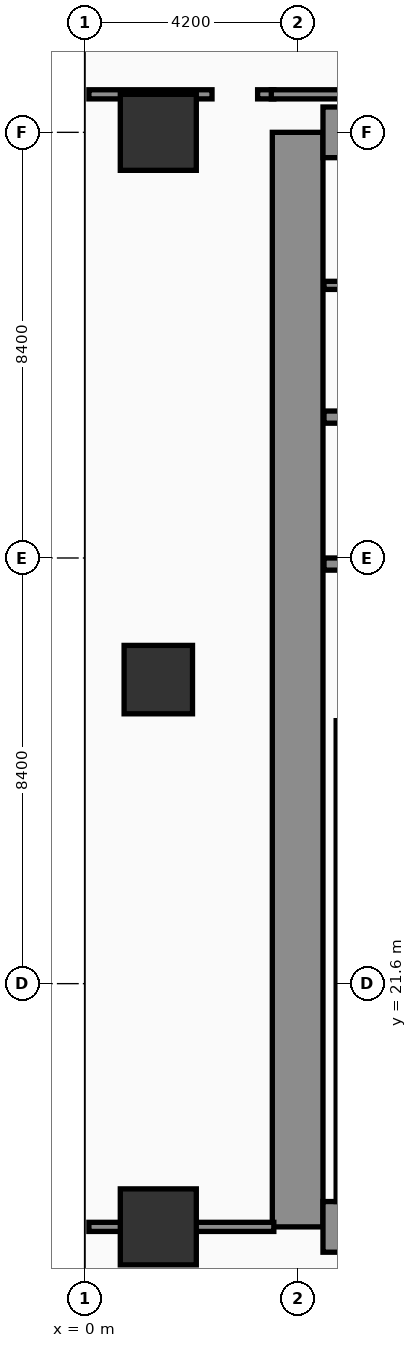
"""IFC4 building model, lengths in metres.
Left out: names, types, materials, properties, quantities, classifications, styles, units other than length and angle.
Written with IfcOpenShell. Run it as: python <this file> out.ifc"""

import sys

from ifc_helpers import new_model, si_unit, direction, frame, frame_2d, origin, origin_2d, place, context, subcontext, project, spatial, rectangle, extrude, element, fill, save


model = new_model("IFC4")
c1 = context("Model", 3, precision=1e-05, world=origin(), true_north=direction((0.0, 1.0)))
c2 = subcontext(c1, "Body", "Model", "MODEL_VIEW")
j1 = project(units=[si_unit("LENGTHUNIT", "METRE"), si_unit("PLANEANGLEUNIT", "RADIAN")], contexts=[c1])
p1 = place(None, origin())
s1 = spatial("IfcSite", under=j1, at=p1, CompositionType="ELEMENT")
p2 = place(p1, origin())
s2 = spatial("IfcBuilding", under=s1, at=p2, CompositionType="ELEMENT")
p3 = place(p2, frame((0.0, 0.0, 66.0)))
s3 = spatial("IfcBuildingStorey", under=s2, at=p3, CompositionType="ELEMENT", Elevation=66.0)
p4 = place(p3, frame((4.2, 16.8, 0.0), z_axis=(0.0, 0.0, 1.0), x_axis=(0.0, 1.0, 0.0)))
e1 = element("IfcWall", 1, at=p4, inside=s3, PredefinedType="SHEAR", context=c2, shape_type="SweptSolid", body=[
    extrude(rectangle(XDim=21.6, YDim=1.0, at=frame_2d((10.8, 0.0))), origin(), (0.0, 0.0, 1.0), 3.56),
])
for number, where, z_axis, x_axis in (
    (2, (4.7, 38.4, 0.0), (0.0, 0.0, 1.0), (1.0, 0.0, 0.0)),
    (3, (4.7, 16.8, 0.0), (0.0, 0.0, 1.0), (1.0, 0.0, 0.0)),
):
    element("IfcWall", number, at=place(p3, frame(where, z_axis=z_axis, x_axis=x_axis)), inside=s3, PredefinedType="SHEAR", context=c2, shape_type="SweptSolid", body=[
        extrude(rectangle(XDim=9.8, YDim=1.0, at=frame_2d((4.9, 0.0))), origin(), (0.0, 0.0, 1.0), 3.56),
    ])
p5 = place(p3, frame((5.08, 17.3, 0.0), z_axis=(0.0, 0.0, 1.0), x_axis=(0.0, 1.0, 0.0)))
e4 = element("IfcWall", 4, at=p5, inside=s3, PredefinedType="SOLIDWALL", context=c2, shape_type="SweptSolid", body=[
    extrude(rectangle(XDim=9.49, YDim=0.24, at=frame_2d((4.745, 0.0))), origin(), (0.0, 0.0, 1.0), 3.56),
])
p6 = place(p3, frame((1.45, 16.8, 0.0), z_axis=(0.0, 0.0, 1.0), x_axis=(1.0, 0.0, 0.0)))
e5 = element("IfcColumn", 5, at=p6, inside=s3, PredefinedType="COLUMN", context=c2, shape_type="SweptSolid", body=[
    extrude(rectangle(XDim=1.5, YDim=1.5, at=origin_2d()), origin(), (0.0, 0.0, 1.0), 3.56),
])
p7 = place(p3, frame((1.45, 27.6, 0.0), z_axis=(0.0, 0.0, 1.0), x_axis=(1.0, 0.0, 0.0)))
e6 = element("IfcColumn", 6, at=p7, inside=s3, PredefinedType="COLUMN", context=c2, shape_type="SweptSolid", body=[
    extrude(rectangle(XDim=1.35, YDim=1.35, at=origin_2d()), origin(), (0.0, 0.0, 1.0), 3.56),
])
p8 = place(p3, frame((1.45, 38.4, 0.0), z_axis=(0.0, 0.0, 1.0), x_axis=(1.0, 0.0, 0.0)))
e7 = element("IfcColumn", 7, at=p8, inside=s3, PredefinedType="COLUMN", context=c2, shape_type="SweptSolid", body=[
    extrude(rectangle(XDim=1.5, YDim=1.5, at=origin_2d()), origin(), (0.0, 0.0, 1.0), 3.56),
])
p9 = place(p3, frame((4.72, 29.88, 0.0), z_axis=(0.0, 0.0, 1.0), x_axis=(1.0, 0.0, 0.0)))
e8 = element("IfcWall", 8, at=p9, inside=s3, PredefinedType="SOLIDWALL", context=c2, shape_type="SweptSolid", body=[
    extrude(rectangle(XDim=4.7, YDim=0.24, at=frame_2d((2.35, 0.0))), origin(), (0.0, 0.0, 1.0), 3.56),
])
p10 = place(p9, frame((0.45, 0.0, 0.0)))
e9 = element("IfcOpeningElement", 9, at=p10, cuts=e8, PredefinedType="OPENING", context=c2, shape_type="SweptSolid", body=[
    extrude(rectangle(XDim=1.3, YDim=2.35, at=frame_2d((0.65, 1.175))), frame((0.0, 0.13, 0.0), z_axis=(0.0, -1.0, 0.0), x_axis=(1.0, 0.0, 0.0)), (0.0, 0.0, 1.0), 0.26),
])
p11 = place(p3, frame((4.72, 32.78, 0.0), z_axis=(0.0, 0.0, 1.0), x_axis=(1.0, 0.0, 0.0)))
e10 = element("IfcWall", 10, at=p11, inside=s3, PredefinedType="SOLIDWALL", context=c2, shape_type="SweptSolid", body=[
    extrude(rectangle(XDim=4.7, YDim=0.24, at=frame_2d((2.35, 0.0))), origin(), (0.0, 0.0, 1.0), 3.56),
])
p12 = place(p3, frame((4.72, 35.38, 0.0), z_axis=(0.0, 0.0, 1.0), x_axis=(1.0, 0.0, 0.0)))
e11 = element("IfcWall", 11, at=p12, inside=s3, PredefinedType="PARTITIONING", context=c2, shape_type="SweptSolid", body=[
    extrude(rectangle(XDim=4.7, YDim=0.16, at=frame_2d((2.35, 0.0))), origin(), (0.0, 0.0, 1.0), 3.56),
])
p13 = place(p12, frame((1.3, 0.0, 0.0)))
e12 = element("IfcOpeningElement", 12, at=p13, cuts=e11, PredefinedType="OPENING", context=c2, shape_type="SweptSolid", body=[
    extrude(rectangle(XDim=0.98, YDim=2.15, at=frame_2d((0.49, 1.075))), frame((0.0, 0.09, 0.0), z_axis=(0.0, -1.0, 0.0), x_axis=(1.0, 0.0, 0.0)), (0.0, 0.0, 1.0), 0.18),
])
p14 = place(p3, frame((0.08, 16.8, 0.0), z_axis=(0.0, 0.0, 1.0), x_axis=(1.0, 0.0, 0.0)))
e13 = element("IfcWall", 13, at=p14, inside=s3, PredefinedType="PARTITIONING", context=c2, shape_type="SweptSolid", body=[
    extrude(rectangle(XDim=3.65, YDim=0.18, at=frame_2d((1.825, 0.0))), origin(), (0.0, 0.0, 1.0), 2.84),
])
p15 = place(p3, frame((0.08, 39.15, 0.0), z_axis=(0.0, 0.0, 1.0), x_axis=(1.0, 0.0, 0.0)))
e14 = element("IfcWall", 14, at=p15, inside=s3, PredefinedType="PARTITIONING", context=c2, shape_type="SweptSolid", body=[
    extrude(rectangle(XDim=3.65, YDim=0.18, at=frame_2d((1.825, 0.0))), origin(), (0.0, 0.0, 1.0), 2.84),
])
p16 = place(p15, frame((2.43, 0.0, 0.0)))
e15 = element("IfcOpeningElement", 15, at=p16, cuts=e14, PredefinedType="OPENING", context=c2, shape_type="SweptSolid", body=[
    extrude(rectangle(XDim=0.9, YDim=2.15, at=frame_2d((0.45, 1.075))), frame((0.0, 0.1, 0.0), z_axis=(0.0, -1.0, 0.0), x_axis=(1.0, 0.0, 0.0)), (0.0, 0.0, 1.0), 0.2),
])
p17 = place(p3, frame((3.68, 39.15, 0.0), z_axis=(0.0, 0.0, 1.0), x_axis=(1.0, 0.0, 0.0)))
e16 = element("IfcWall", 16, at=p17, inside=s3, PredefinedType="PARTITIONING", context=c2, shape_type="SweptSolid", body=[
    extrude(rectangle(XDim=11.47, YDim=0.18, at=frame_2d((5.735, 0.0))), origin(), (0.0, 0.0, 1.0), 2.84),
])
p18 = place(p16, origin())
e17 = element("IfcDoor", 17, at=p18, inside=s3, OperationType="SINGLE_SWING_LEFT", PredefinedType="DOOR", context=c2, shape_type="SweptSolid", body=[
    extrude(rectangle(XDim=0.9, YDim=2.15, at=frame_2d((0.45, 1.075))), frame((0.0, 0.025, 0.0), z_axis=(0.0, -1.0, 0.0), x_axis=(1.0, 0.0, 0.0)), (0.0, 0.0, 1.0), 0.05),
])
fill(e15, e17)
save(model, sys.argv[1])
